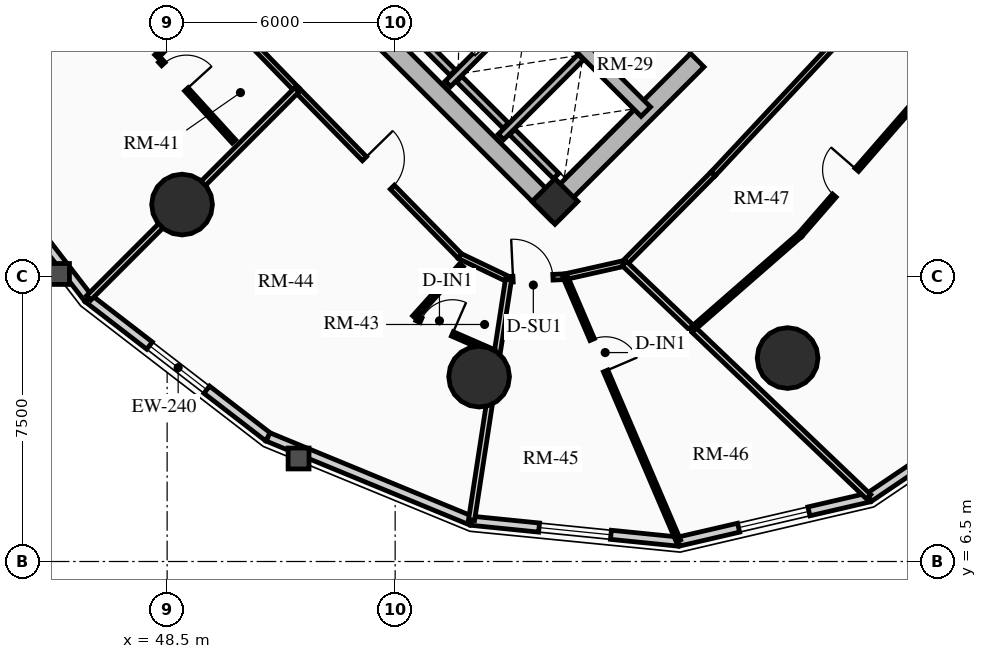
"""IFC4 building model, lengths in metres.
Left out: names, types, materials, properties, quantities, classifications, styles, units other than length and angle.
Written with IfcOpenShell. Run it as: python <this file> out.ifc"""

import sys

from ifc_helpers import new_model, si_unit, direction, frame, frame_2d, origin, origin_2d, place, context, subcontext, project, spatial, rectangle, circle, extrude, source, transform, mapped, element, fill, save


model = new_model("IFC4")
c1 = context("Model", 3, precision=1e-05, world=origin(), true_north=direction((0.0, 1.0)))
c2 = subcontext(c1, "Body", "Model", "MODEL_VIEW")
j1 = project(units=[si_unit("LENGTHUNIT", "METRE"), si_unit("PLANEANGLEUNIT", "RADIAN")], contexts=[c1])
p1 = place(None, origin())
s1 = spatial("IfcSite", under=j1, at=p1, CompositionType="ELEMENT")
p2 = place(p1, origin())
s2 = spatial("IfcBuilding", under=s1, at=p2, CompositionType="ELEMENT")
p3 = place(p2, frame((0.0, 0.0, 54.01)))
s3 = spatial("IfcBuildingStorey", under=s2, at=p3, CompositionType="ELEMENT", Elevation=54.01)
p4 = place(p3, frame((58.773, 15.661, 0.0), z_axis=(0.0, 0.0, 1.0), x_axis=(-0.707106781187, 0.707106781187, 0.0)))
e1 = element("IfcWall", 1, at=p4, inside=s3, PredefinedType="SHEAR", context=c2, shape_type="SweptSolid", body=[
    extrude(rectangle(XDim=14.3, YDim=0.5, at=frame_2d((7.15, 0.0))), origin(), (0.0, 0.0, 1.0), 2.91),
])
p5 = place(p3, frame((58.596, 15.838, 0.0), z_axis=(0.0, 0.0, 1.0), x_axis=(0.707106781187, 0.707106781187, 0.0)))
e2 = element("IfcWall", 2, at=p5, inside=s3, PredefinedType="SHEAR", context=c2, shape_type="SweptSolid", body=[
    extrude(rectangle(XDim=10.7, YDim=0.5, at=frame_2d((5.35, 0.0))), origin(), (0.0, 0.0, 1.0), 2.91),
])
m1 = source(origin(), c2, "Body", "SweptSolid", [
    extrude(rectangle(XDim=1.5, YDim=2.02, at=frame_2d((0.75, 1.01))), frame((0.0, 0.26, 0.0), z_axis=(0.0, -1.0, 0.0), x_axis=(1.0, 0.0, 0.0)), (0.0, 0.0, 1.0), 0.52),
])
p6 = place(p5, frame((5.45, 0.0, 0.0)))
e3 = element("IfcOpeningElement", 3, at=p6, cuts=e2, PredefinedType="OPENING", context=c2, shape_type="MappedRepresentation", body=[
    mapped(m1, transform((0.0, 0.0, 0.0), x_axis=(1.0, 0.0, 0.0), y_axis=(0.0, 1.0, 0.0), z_axis=(0.0, 0.0, 1.0), scale=1.0)),
])
p7 = place(p3, frame((61.096, 18.338, 0.0), z_axis=(0.0, 0.0, 1.0), x_axis=(-0.707106781187, 0.707106781187, 0.0)))
e4 = element("IfcWall", 4, at=p7, inside=s3, PredefinedType="SHEAR", context=c2, shape_type="SweptSolid", body=[
    extrude(rectangle(XDim=13.8, YDim=0.35, at=frame_2d((6.9, 0.0))), origin(), (0.0, 0.0, 1.0), 2.91),
])
m2 = source(origin(), c2, "Body", "SweptSolid", [
    extrude(rectangle(XDim=1.1, YDim=2.015, at=frame_2d((0.55, 1.007))), frame((0.0, 0.185, 0.0), z_axis=(0.0, -1.0, 0.0), x_axis=(1.0, 0.0, 0.0)), (0.0, 0.0, 1.0), 0.37),
])
p8 = place(p7, frame((4.9, 0.0, 0.0)))
e5 = element("IfcOpeningElement", 5, at=p8, cuts=e4, PredefinedType="OPENING", context=c2, shape_type="MappedRepresentation", body=[
    mapped(m2, transform((0.0, 0.0, 0.0), x_axis=(1.0, 0.0, 0.0), y_axis=(0.0, 1.0, 0.0), z_axis=(0.0, 0.0, 1.0), scale=1.0)),
])
m3 = source(origin(), c2, "Body", "SweptSolid", [
    extrude(rectangle(XDim=1.15, YDim=2.02, at=frame_2d((0.575, 1.01))), frame((0.0, 0.185, 0.0), z_axis=(0.0, -1.0, 0.0), x_axis=(1.0, 0.0, 0.0)), (0.0, 0.0, 1.0), 0.37),
])
p9 = place(p7, frame((7.32, 0.0, 0.0)))
e6 = element("IfcOpeningElement", 6, at=p9, cuts=e4, PredefinedType="OPENING", context=c2, shape_type="MappedRepresentation", body=[
    mapped(m3, transform((0.0, 0.0, 0.0), x_axis=(1.0, 0.0, 0.0), y_axis=(0.0, 1.0, 0.0), z_axis=(0.0, 0.0, 1.0), scale=1.0)),
])
p10 = place(p3, frame((58.706, 15.976, 0.0), z_axis=(0.0, 0.0, 1.0), x_axis=(0.707106781187, 0.707106781187, 0.0)))
e7 = element("IfcColumn", 7, at=p10, inside=s3, PredefinedType="COLUMN", context=c2, shape_type="SweptSolid", body=[
    extrude(rectangle(XDim=0.85, YDim=0.85, at=origin_2d()), origin(), (0.0, 0.0, 1.0), 2.91),
])
for number, where, z_axis, x_axis in (
    (8, (48.893, 15.893, 0.0), (0.0, 0.0, 1.0), (1.0, 0.0, 0.0)),
    (9, (56.709, 11.365, 0.0), (0.0, 0.0, 1.0), (1.0, 0.0, 0.0)),
    (10, (64.827, 11.854, 0.0), (0.0, 0.0, 1.0), (1.0, 0.0, 0.0)),
):
    element("IfcColumn", number, at=place(p3, frame(where, z_axis=z_axis, x_axis=x_axis)), inside=s3, PredefinedType="USERDEFINED", context=c2, shape_type="SweptSolid", body=[
        extrude(circle(Radius=0.8, at=origin_2d()), origin(), (0.0, 0.0, 1.0), 2.91),
    ])
p11 = place(p3, frame((46.425, 13.425, 0.0), z_axis=(0.0, 0.0, 1.0), x_axis=(-0.610502519057, 0.792014314407, 0.0)))
e11 = element("IfcWall", 11, at=p11, inside=s3, PredefinedType="SOLIDWALL", context=c2, shape_type="SweptSolid", body=[
    extrude(rectangle(XDim=5.973, YDim=0.24, at=frame_2d((2.987, 0.0))), origin(), (0.0, 0.0, 1.0), 2.073),
])
p12 = place(p3, frame((51.156, 9.778, 0.0), z_axis=(0.0, 0.0, 1.0), x_axis=(-0.792014314407, 0.610502519057, 0.0)))
e12 = element("IfcWall", 12, at=p12, inside=s3, PredefinedType="SOLIDWALL", context=c2, shape_type="SweptSolid", body=[
    extrude(rectangle(XDim=5.973, YDim=0.24, at=frame_2d((2.987, 0.0))), origin(), (0.0, 0.0, 1.0), 2.073),
])
m4 = source(origin(), c2, "Body", "SweptSolid", [
    extrude(rectangle(XDim=1.9, YDim=1.35, at=frame_2d((0.95, 0.675))), frame((0.0, 0.13, 0.0), z_axis=(0.0, -1.0, 0.0), x_axis=(1.0, 0.0, 0.0)), (0.0, 0.0, 1.0), 0.26),
])
p13 = place(p12, frame((2.037, 0.0, 0.65)))
e13 = element("IfcOpeningElement", 13, at=p13, cuts=e12, PredefinedType="OPENING", context=c2, shape_type="MappedRepresentation", body=[
    mapped(m4, transform((0.0, 0.0, 0.0), x_axis=(1.0, 0.0, 0.0), y_axis=(0.0, 1.0, 0.0), z_axis=(0.0, 0.0, 1.0), scale=1.0)),
])
p14 = place(p3, frame((56.507, 7.572, 0.0), z_axis=(0.0, 0.0, 1.0), x_axis=(-0.924563629567, 0.381027682565, 0.0)))
e14 = element("IfcWall", 14, at=p14, inside=s3, PredefinedType="SOLIDWALL", context=c2, shape_type="SweptSolid", body=[
    extrude(rectangle(XDim=5.789, YDim=0.24, at=frame_2d((2.894, 0.0))), origin(), (0.0, 0.0, 1.0), 2.073),
])
p15 = place(p3, frame((61.957, 7.024, 0.0), z_axis=(0.0, 0.0, 1.0), x_axis=(-0.994970765694, 0.100165739718, 0.0)))
e15 = element("IfcWall", 15, at=p15, inside=s3, PredefinedType="SOLIDWALL", context=c2, shape_type="SweptSolid", body=[
    extrude(rectangle(XDim=5.477, YDim=0.24, at=frame_2d((2.738, 0.0))), origin(), (0.0, 0.0, 1.0), 2.073),
])
p16 = place(p15, frame((1.788, 0.0, 0.65)))
e16 = element("IfcOpeningElement", 16, at=p16, cuts=e15, PredefinedType="OPENING", context=c2, shape_type="MappedRepresentation", body=[
    mapped(m4, transform((0.0, 0.0, 0.0), x_axis=(1.0, 0.0, 0.0), y_axis=(0.0, 1.0, 0.0), z_axis=(0.0, 0.0, 1.0), scale=1.0)),
])
p17 = place(p3, frame((66.969, 8.186, 0.0), z_axis=(0.0, 0.0, 1.0), x_axis=(-0.974166016949, -0.225833060959, 0.0)))
e17 = element("IfcWall", 17, at=p17, inside=s3, PredefinedType="SOLIDWALL", context=c2, shape_type="SweptSolid", body=[
    extrude(rectangle(XDim=5.146, YDim=0.24, at=frame_2d((2.573, 0.0))), origin(), (0.0, 0.0, 1.0), 2.073),
])
p18 = place(p17, frame((1.623, 0.0, 0.65)))
e18 = element("IfcOpeningElement", 18, at=p18, cuts=e17, PredefinedType="OPENING", context=c2, shape_type="MappedRepresentation", body=[
    mapped(m4, transform((0.0, 0.0, 0.0), x_axis=(1.0, 0.0, 0.0), y_axis=(0.0, 1.0, 0.0), z_axis=(0.0, 0.0, 1.0), scale=1.0)),
])
p19 = place(p3, frame((71.055, 10.945, 0.0), z_axis=(0.0, 0.0, 1.0), x_axis=(-0.828736708604, -0.559638693991, 0.0)))
e19 = element("IfcWall", 19, at=p19, inside=s3, PredefinedType="SOLIDWALL", context=c2, shape_type="SweptSolid", body=[
    extrude(rectangle(XDim=4.93, YDim=0.24, at=frame_2d((2.465, 0.0))), origin(), (0.0, 0.0, 1.0), 2.073),
])
p20 = place(p3, frame((55.888, 19.069, 0.0), z_axis=(0.0, 0.0, 1.0), x_axis=(0.707106781187, 0.707106781187, 0.0)))
e20 = element("IfcWall", 20, at=p20, inside=s3, PredefinedType="SHEAR", context=c2, shape_type="SweptSolid", body=[
    extrude(rectangle(XDim=2.97, YDim=0.2, at=frame_2d((1.485, 0.0))), origin(), (0.0, 0.0, 1.0), 2.91),
])
p21 = place(p3, frame((56.015, 19.366, 0.0), z_axis=(0.0, 0.0, 1.0), x_axis=(-0.707106781187, 0.707106781187, 0.0)))
e21 = element("IfcWall", 21, at=p21, inside=s3, PredefinedType="SHEAR", context=c2, shape_type="SweptSolid", body=[
    extrude(rectangle(XDim=2.44, YDim=0.2, at=frame_2d((1.22, 0.0))), origin(), (0.0, 0.0, 1.0), 2.91),
])
p22 = place(p3, frame((57.284, 17.673, 0.0), z_axis=(0.0, 0.0, 1.0), x_axis=(0.707147878904, 0.70706568108, 0.0)))
e22 = element("IfcWall", 22, at=p22, inside=s3, PredefinedType="SHEAR", context=c2, shape_type="SweptSolid", body=[
    extrude(rectangle(XDim=2.97, YDim=0.2, at=frame_2d((1.485, 0.0))), origin(), (0.0, 0.0, 1.0), 2.91),
])
p23 = place(p3, frame((57.412, 17.97, 0.0), z_axis=(0.0, 0.0, 1.0), x_axis=(-0.707106781187, 0.707106781187, 0.0)))
e23 = element("IfcWall", 23, at=p23, inside=s3, PredefinedType="SHEAR", context=c2, shape_type="SweptSolid", body=[
    extrude(rectangle(XDim=1.735, YDim=0.2, at=frame_2d((0.867, 0.0))), origin(), (0.0, 0.0, 1.0), 2.91),
])
p24 = place(p3, frame((58.737, 16.644, 0.0), z_axis=(0.0, 0.0, 1.0), x_axis=(-0.707032117043, 0.707181437447, 0.0)))
e24 = element("IfcWall", 24, at=p24, inside=s3, PredefinedType="SHEAR", context=c2, shape_type="SweptSolid", body=[
    extrude(rectangle(XDim=1.635, YDim=0.2, at=frame_2d((0.817, 0.0))), origin(), (0.0, 0.0, 1.0), 2.91),
])
p25 = place(p3, frame((47.729, 23.23, 0.0), z_axis=(0.0, 0.0, 1.0), x_axis=(0.696119834292, -0.717925606386, 0.0)))
e25 = element("IfcWall", 25, at=p25, inside=s3, PredefinedType="PARTITIONING", context=c2, shape_type="SweptSolid", body=[
    extrude(rectangle(XDim=6.012, YDim=0.15, at=frame_2d((3.006, 0.0))), origin(), (0.0, 0.0, 1.0), 2.635),
])
p26 = place(p3, frame((51.914, 18.914, 0.0), z_axis=(0.0, 0.0, 1.0), x_axis=(0.6999614951, -0.71418058317, 0.0)))
e26 = element("IfcWall", 26, at=p26, inside=s3, PredefinedType="PARTITIONING", context=c2, shape_type="SweptSolid", body=[
    extrude(rectangle(XDim=6.13, YDim=0.15, at=frame_2d((3.065, 0.0))), origin(), (0.0, 0.0, 1.0), 2.159),
])
m5 = source(origin(), c2, "Body", "SweptSolid", [
    extrude(rectangle(XDim=1.05, YDim=2.015, at=frame_2d((0.525, 1.007))), frame((0.0, 0.085, 0.0), z_axis=(0.0, -1.0, 0.0), x_axis=(1.0, 0.0, 0.0)), (0.0, 0.0, 1.0), 0.17),
])
p27 = place(p26, frame((2.54, 0.0, 0.0)))
e27 = element("IfcOpeningElement", 27, at=p27, cuts=e26, PredefinedType="OPENING", context=c2, shape_type="MappedRepresentation", body=[
    mapped(m5, transform((0.0, 0.0, 0.0), x_axis=(1.0, 0.0, 0.0), y_axis=(0.0, 1.0, 0.0), z_axis=(0.0, 0.0, 1.0), scale=1.0)),
])
p28 = place(p3, frame((56.204, 14.536, 0.0), z_axis=(0.0, 0.0, 1.0), x_axis=(0.902244982981, -0.431223828986, 0.0)))
e28 = element("IfcWall", 28, at=p28, inside=s3, PredefinedType="PARTITIONING", context=c2, shape_type="SweptSolid", body=[
    extrude(rectangle(XDim=1.417, YDim=0.15, at=frame_2d((0.708, 0.0))), origin(), (0.0, 0.0, 1.0), 2.205),
])
p29 = place(p3, frame((57.483, 13.925, 0.0), z_axis=(0.0, 0.0, 1.0), x_axis=(0.998884345706, 0.047223552414, 0.0)))
e29 = element("IfcWall", 29, at=p29, inside=s3, PredefinedType="PARTITIONING", context=c2, shape_type="SweptSolid", body=[
    extrude(rectangle(XDim=1.494, YDim=0.15, at=frame_2d((0.747, 0.0))), origin(), (0.0, 0.0, 1.0), 2.159),
])
p30 = place(p29, frame((0.12, 0.0, 0.0)))
e30 = element("IfcOpeningElement", 30, at=p30, cuts=e29, PredefinedType="OPENING", context=c2, shape_type="MappedRepresentation", body=[
    mapped(m5, transform((0.0, 0.0, 0.0), x_axis=(1.0, 0.0, 0.0), y_axis=(0.0, 1.0, 0.0), z_axis=(0.0, 0.0, 1.0), scale=1.0)),
])
p31 = place(p3, frame((58.975, 13.996, 0.0), z_axis=(0.0, 0.0, 1.0), x_axis=(0.975700857392, 0.219106907431, 0.0)))
e31 = element("IfcWall", 31, at=p31, inside=s3, PredefinedType="PARTITIONING", context=c2, shape_type="SweptSolid", body=[
    extrude(rectangle(XDim=1.591, YDim=0.15, at=frame_2d((0.795, 0.0))), origin(), (0.0, 0.0, 1.0), 2.205),
])
p32 = place(p3, frame((60.528, 14.344, 0.0), z_axis=(0.0, 0.0, 1.0), x_axis=(0.704381645997, 0.709821454158, 0.0)))
e32 = element("IfcWall", 32, at=p32, inside=s3, PredefinedType="PARTITIONING", context=c2, shape_type="SweptSolid", body=[
    extrude(rectangle(XDim=3.321, YDim=0.15, at=frame_2d((1.661, 0.0))), origin(), (0.0, 0.0, 1.0), 2.159),
])
p33 = place(p3, frame((62.867, 16.702, 0.0), z_axis=(0.0, 0.0, 1.0), x_axis=(0.682449206191, 0.73093302085, 0.0)))
e33 = element("IfcWall", 33, at=p33, inside=s3, PredefinedType="PARTITIONING", context=c2, shape_type="SweptSolid", body=[
    extrude(rectangle(XDim=6.642, YDim=0.15, at=frame_2d((3.321, 0.0))), origin(), (0.0, 0.0, 1.0), 2.159),
])
p34 = place(p3, frame((51.914, 18.914, 0.0), z_axis=(0.0, 0.0, 1.0), x_axis=(-0.707106781187, -0.707106781187, 0.0)))
e34 = element("IfcWall", 34, at=p34, inside=s3, PredefinedType="PARTITIONING", context=c2, shape_type="SweptSolid", body=[
    extrude(rectangle(XDim=7.743, YDim=0.16, at=frame_2d((3.872, 0.0))), origin(), (0.0, 0.0, 1.0), 2.073),
])
p35 = place(p3, frame((57.483, 13.925, 0.0), z_axis=(0.0, 0.0, 1.0), x_axis=(-0.151762268519, -0.988417024264, 0.0)))
e35 = element("IfcWall", 35, at=p35, inside=s3, PredefinedType="PARTITIONING", context=c2, shape_type="SweptSolid", body=[
    extrude(rectangle(XDim=6.407, YDim=0.16, at=frame_2d((3.204, 0.0))), origin(), (0.0, 0.0, 1.0), 2.073),
])
p36 = place(p3, frame((60.528, 14.344, 0.0), z_axis=(0.0, 0.0, 1.0), x_axis=(0.723320016743, -0.690512963947, 0.0)))
e36 = element("IfcWall", 36, at=p36, inside=s3, PredefinedType="PARTITIONING", context=c2, shape_type="SweptSolid", body=[
    extrude(rectangle(XDim=8.893, YDim=0.16, at=frame_2d((4.446, 0.0))), origin(), (0.0, 0.0, 1.0), 2.073),
])
p37 = place(p3, frame((49.498, 21.087, 0.0), z_axis=(0.0, 0.0, 1.0), x_axis=(-0.702129708151, -0.71204906638, 0.0)))
e37 = element("IfcWall", 37, at=p37, inside=s3, PredefinedType="PARTITIONING", context=c2, shape_type="SweptSolid", body=[
    extrude(rectangle(XDim=1.821, YDim=0.125, at=frame_2d((0.911, 0.0))), origin(), (0.0, 0.0, 1.0), 2.635),
])
p38 = place(p3, frame((48.32, 19.68, 0.0), z_axis=(0.0, 0.0, 1.0), x_axis=(0.673403410236, -0.739275217414, 0.0)))
e38 = element("IfcWall", 38, at=p38, inside=s3, PredefinedType="PARTITIONING", context=c2, shape_type="SweptSolid", body=[
    extrude(rectangle(XDim=2.876, YDim=0.125, at=frame_2d((1.438, 0.0))), origin(), (0.0, 0.0, 1.0), 2.635),
])
m6 = source(origin(), c2, "Body", "SweptSolid", [
    extrude(rectangle(XDim=0.9, YDim=2.005, at=frame_2d((0.45, 1.002))), frame((0.0, 0.073, 0.0), z_axis=(0.0, -1.0, 0.0), x_axis=(1.0, 0.0, 0.0)), (0.0, 0.0, 1.0), 0.145),
])
p39 = place(p38, frame((0.12, 0.0, 0.0)))
e39 = element("IfcOpeningElement", 39, at=p39, cuts=e38, PredefinedType="OPENING", context=c2, shape_type="MappedRepresentation", body=[
    mapped(m6, transform((0.0, 0.0, 0.0), x_axis=(1.0, 0.0, 0.0), y_axis=(0.0, 1.0, 0.0), z_axis=(0.0, 0.0, 1.0), scale=1.0)),
])
p40 = place(p3, frame((56.249, 14.302, 0.0), z_axis=(0.0, 0.0, 1.0), x_axis=(-0.669226451819, -0.743058514645, 0.0)))
e40 = element("IfcWall", 40, at=p40, inside=s3, PredefinedType="PARTITIONING", context=c2, shape_type="SweptSolid", body=[
    extrude(rectangle(XDim=1.855, YDim=0.125, at=frame_2d((0.927, 0.0))), origin(), (0.0, 0.0, 1.0), 2.205),
])
p41 = place(p3, frame((55.071, 12.896, 0.0), z_axis=(0.0, 0.0, 1.0), x_axis=(0.916939896123, -0.399025346184, 0.0)))
e41 = element("IfcWall", 41, at=p41, inside=s3, PredefinedType="PARTITIONING", context=c2, shape_type="SweptSolid", body=[
    extrude(rectangle(XDim=2.208, YDim=0.125, at=frame_2d((1.104, 0.0))), origin(), (0.0, 0.0, 1.0), 2.159),
])
p42 = place(p41, frame((0.12, 0.0, 0.0)))
e42 = element("IfcOpeningElement", 42, at=p42, cuts=e41, PredefinedType="OPENING", context=c2, shape_type="MappedRepresentation", body=[
    mapped(m6, transform((0.0, 0.0, 0.0), x_axis=(1.0, 0.0, 0.0), y_axis=(0.0, 1.0, 0.0), z_axis=(0.0, 0.0, 1.0), scale=1.0)),
])
p43 = place(p3, frame((58.975, 13.996, 0.0), z_axis=(0.0, 0.0, 1.0), x_axis=(0.393755664375, -0.919215141723, 0.0)))
e43 = element("IfcWall", 43, at=p43, inside=s3, PredefinedType="PARTITIONING", context=c2, shape_type="SweptSolid", body=[
    extrude(rectangle(XDim=7.563, YDim=0.125, at=frame_2d((3.782, 0.0))), origin(), (0.0, 0.0, 1.0), 2.073),
])
p44 = place(p43, frame((1.8, 0.0, 0.0)))
e44 = element("IfcOpeningElement", 44, at=p44, cuts=e43, PredefinedType="OPENING", context=c2, shape_type="MappedRepresentation", body=[
    mapped(m6, transform((0.0, 0.0, 0.0), x_axis=(1.0, 0.0, 0.0), y_axis=(0.0, 1.0, 0.0), z_axis=(0.0, 0.0, 1.0), scale=1.0)),
])
p45 = place(p3, frame((62.329, 12.625, 0.0), z_axis=(0.0, 0.0, 1.0), x_axis=(0.753237140985, 0.657749047465, 0.0)))
e45 = element("IfcWall", 45, at=p45, inside=s3, PredefinedType="PARTITIONING", context=c2, shape_type="SweptSolid", body=[
    extrude(rectangle(XDim=3.753, YDim=0.125, at=frame_2d((1.877, 0.0))), origin(), (0.0, 0.0, 1.0), 2.159),
])
p46 = place(p3, frame((65.156, 15.094, 0.0), z_axis=(0.0, 0.0, 1.0), x_axis=(0.656356662483, 0.754450748302, 0.0)))
e46 = element("IfcWall", 46, at=p46, inside=s3, PredefinedType="PARTITIONING", context=c2, shape_type="SweptSolid", body=[
    extrude(rectangle(XDim=6.147, YDim=0.125, at=frame_2d((3.074, 0.0))), origin(), (0.0, 0.0, 1.0), 2.159),
])
p47 = place(p46, frame((1.372, 0.0, 0.0)))
e47 = element("IfcOpeningElement", 47, at=p47, cuts=e46, PredefinedType="OPENING", context=c2, shape_type="MappedRepresentation", body=[
    mapped(m6, transform((0.0, 0.0, 0.0), x_axis=(1.0, 0.0, 0.0), y_axis=(0.0, 1.0, 0.0), z_axis=(0.0, 0.0, 1.0), scale=1.0)),
])
m7 = source(origin(), c2, "Body", "SweptSolid", [
    extrude(rectangle(XDim=1.9, YDim=1.35, at=frame_2d((0.95, 0.675))), frame((0.0, 0.03, 0.0), z_axis=(0.0, -1.0, 0.0), x_axis=(1.0, 0.0, 0.0)), (0.0, 0.0, 1.0), 0.06),
])
p48 = place(p13, origin())
e48 = element("IfcWindow", 48, at=p48, inside=s3, PartitioningType="DOUBLE_PANEL_VERTICAL", PredefinedType="WINDOW", context=c2, shape_type="MappedRepresentation", body=[
    mapped(m7, transform((0.0, 0.0, 0.0), x_axis=(1.0, 0.0, 0.0), y_axis=(0.0, 1.0, 0.0), z_axis=(0.0, 0.0, 1.0), scale=1.0)),
])
fill(e13, e48)
p49 = place(p16, origin())
e49 = element("IfcWindow", 49, at=p49, inside=s3, PartitioningType="DOUBLE_PANEL_VERTICAL", PredefinedType="WINDOW", context=c2, shape_type="MappedRepresentation", body=[
    mapped(m7, transform((0.0, 0.0, 0.0), x_axis=(1.0, 0.0, 0.0), y_axis=(0.0, 1.0, 0.0), z_axis=(0.0, 0.0, 1.0), scale=1.0)),
])
fill(e16, e49)
p50 = place(p18, origin())
e50 = element("IfcWindow", 50, at=p50, inside=s3, PartitioningType="DOUBLE_PANEL_VERTICAL", PredefinedType="WINDOW", context=c2, shape_type="MappedRepresentation", body=[
    mapped(m7, transform((0.0, 0.0, 0.0), x_axis=(1.0, 0.0, 0.0), y_axis=(0.0, 1.0, 0.0), z_axis=(0.0, 0.0, 1.0), scale=1.0)),
])
fill(e18, e50)
m8 = source(origin(), c2, "Body", "SweptSolid", [
    extrude(rectangle(XDim=1.5, YDim=2.02, at=frame_2d((0.75, 1.01))), frame((0.0, 0.025, 0.0), z_axis=(0.0, -1.0, 0.0), x_axis=(1.0, 0.0, 0.0)), (0.0, 0.0, 1.0), 0.05),
])
p51 = place(p6, origin())
e51 = element("IfcDoor", 51, at=p51, inside=s3, OperationType="DOUBLE_DOOR_SINGLE_SWING", PredefinedType="DOOR", context=c2, shape_type="MappedRepresentation", body=[
    mapped(m8, transform((0.0, 0.0, 0.0), x_axis=(1.0, 0.0, 0.0), y_axis=(0.0, 1.0, 0.0), z_axis=(0.0, 0.0, 1.0), scale=1.0)),
])
fill(e3, e51)
m9 = source(origin(), c2, "Body", "SweptSolid", [
    extrude(rectangle(XDim=0.9, YDim=2.005, at=frame_2d((0.45, 1.002))), frame((0.0, 0.025, 0.0), z_axis=(0.0, -1.0, 0.0), x_axis=(1.0, 0.0, 0.0)), (0.0, 0.0, 1.0), 0.05),
])
p52 = place(p39, origin())
e52 = element("IfcDoor", 52, at=p52, inside=s3, OperationType="SINGLE_SWING_RIGHT", PredefinedType="DOOR", context=c2, shape_type="MappedRepresentation", body=[
    mapped(m9, transform((0.0, 0.0, 0.0), x_axis=(1.0, 0.0, 0.0), y_axis=(0.0, 1.0, 0.0), z_axis=(0.0, 0.0, 1.0), scale=1.0)),
])
fill(e39, e52)
m10 = source(origin(), c2, "Body", "SweptSolid", [
    extrude(rectangle(XDim=1.05, YDim=2.015, at=frame_2d((0.525, 1.007))), frame((0.0, 0.025, 0.0), z_axis=(0.0, -1.0, 0.0), x_axis=(1.0, 0.0, 0.0)), (0.0, 0.0, 1.0), 0.05),
])
p53 = place(p27, origin())
e53 = element("IfcDoor", 53, at=p53, inside=s3, OperationType="SINGLE_SWING_LEFT", PredefinedType="DOOR", context=c2, shape_type="MappedRepresentation", body=[
    mapped(m10, transform((0.0, 0.0, 0.0), x_axis=(1.0, 0.0, 0.0), y_axis=(0.0, 1.0, 0.0), z_axis=(0.0, 0.0, 1.0), scale=1.0)),
])
fill(e27, e53)
p54 = place(p42, origin())
e54 = element("IfcDoor", 54, at=p54, inside=s3, OperationType="SINGLE_SWING_RIGHT", PredefinedType="DOOR", context=c2, shape_type="MappedRepresentation", body=[
    mapped(m9, transform((0.0, 0.0, 0.0), x_axis=(1.0, 0.0, 0.0), y_axis=(0.0, 1.0, 0.0), z_axis=(0.0, 0.0, 1.0), scale=1.0)),
])
fill(e42, e54)
p55 = place(p30, origin())
e55 = element("IfcDoor", 55, at=p55, inside=s3, OperationType="SINGLE_SWING_LEFT", PredefinedType="DOOR", context=c2, shape_type="MappedRepresentation", body=[
    mapped(m10, transform((0.0, 0.0, 0.0), x_axis=(1.0, 0.0, 0.0), y_axis=(0.0, 1.0, 0.0), z_axis=(0.0, 0.0, 1.0), scale=1.0)),
])
fill(e30, e55)
p56 = place(p44, origin())
e56 = element("IfcDoor", 56, at=p56, inside=s3, OperationType="SINGLE_SWING_RIGHT", PredefinedType="DOOR", context=c2, shape_type="MappedRepresentation", body=[
    mapped(m9, transform((0.0, 0.0, 0.0), x_axis=(1.0, 0.0, 0.0), y_axis=(0.0, 1.0, 0.0), z_axis=(0.0, 0.0, 1.0), scale=1.0)),
])
fill(e44, e56)
p57 = place(p47, origin())
e57 = element("IfcDoor", 57, at=p57, inside=s3, OperationType="SINGLE_SWING_RIGHT", PredefinedType="DOOR", context=c2, shape_type="MappedRepresentation", body=[
    mapped(m9, transform((0.0, 0.0, 0.0), x_axis=(1.0, 0.0, 0.0), y_axis=(0.0, 1.0, 0.0), z_axis=(0.0, 0.0, 1.0), scale=1.0)),
])
fill(e47, e57)
save(model, sys.argv[1])
